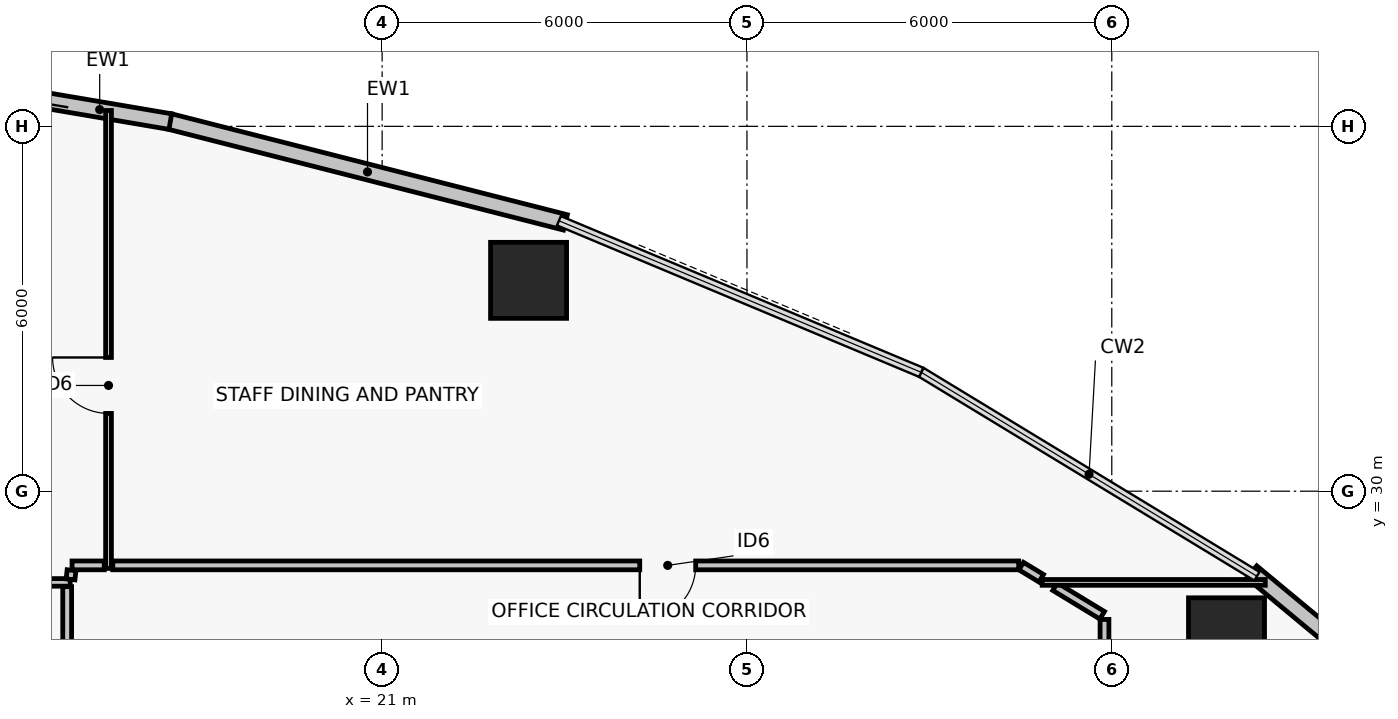
"""IFC4 building model, lengths in metres.
Left out: names, types, materials, properties, quantities, classifications, styles, units other than length and angle.
Written with IfcOpenShell. Run it as: python <this file> out.ifc"""

import sys

from ifc_helpers import new_model, si_unit, direction, frame, frame_2d, origin, origin_2d, place, context, subcontext, project, spatial, rectangle, hollow_rectangle, extrude, element, fill, save


model = new_model("IFC4")
c1 = context("Model", 3, precision=1e-05, world=origin(), true_north=direction((0.0, 1.0)))
c2 = subcontext(c1, "Body", "Model", "MODEL_VIEW")
j1 = project(units=[si_unit("LENGTHUNIT", "METRE"), si_unit("PLANEANGLEUNIT", "RADIAN")], contexts=[c1])
p1 = place(None, origin())
s1 = spatial("IfcSite", under=j1, at=p1, CompositionType="ELEMENT")
p2 = place(p1, origin())
s2 = spatial("IfcBuilding", under=s1, at=p2, CompositionType="ELEMENT")
p3 = place(p2, frame((0.0, 0.0, 75.96)))
s3 = spatial("IfcBuildingStorey", under=s2, at=p3, CompositionType="ELEMENT", Elevation=75.96)
for number, where, z_axis, x_axis in (
    (1, (34.887, 27.622, 0.0), (0.0, 0.0, 1.0), (1.0, 0.0, 0.0)),
    (2, (23.408, 33.467, 0.0), (0.0, 0.0, 1.0), (1.0, 0.0, 0.0)),
):
    element("IfcColumn", number, at=place(p3, frame(where, z_axis=z_axis, x_axis=x_axis)), inside=s3, PredefinedType="COLUMN", context=c2, shape_type="SweptSolid", body=[
        extrude(hollow_rectangle(XDim=1.25, YDim=1.25, WallThickness=0.05, at=origin_2d()), origin(), (0.0, 0.0, 1.0), 3.72),
    ])
p4 = place(p3, frame((35.301, 28.672, 0.0), z_axis=(0.0, 0.0, 1.0), x_axis=(0.76975316947, -0.638341646841, 0.0)))
e3 = element("IfcWall", 3, at=p4, inside=s3, PredefinedType="PARTITIONING", context=c2, shape_type="SweptSolid", body=[
    extrude(rectangle(XDim=6.718, YDim=0.26, at=frame_2d((3.359, 0.0))), origin(), (0.0, 0.0, 1.0), 3.47),
])
p5 = place(p3, frame((17.505, 36.081, 0.0), z_axis=(0.0, 0.0, 1.0), x_axis=(0.968981437296, -0.247133514876, 0.0)))
e4 = element("IfcWall", 4, at=p5, inside=s3, PredefinedType="PARTITIONING", context=c2, shape_type="SweptSolid", body=[
    extrude(rectangle(XDim=6.718, YDim=0.26, at=frame_2d((3.359, 0.0))), origin(), (0.0, 0.0, 1.0), 3.47),
])
p6 = place(p3, frame((15.193, 36.472, 0.0), z_axis=(0.0, 0.0, 1.0), x_axis=(0.985905269947, -0.167304508875, 0.0)))
e5 = element("IfcWall", 5, at=p6, inside=s3, PredefinedType="PARTITIONING", context=c2, shape_type="SweptSolid", body=[
    extrude(rectangle(XDim=2.357, YDim=0.26, at=frame_2d((1.178, 0.0))), origin(), (0.0, 0.0, 1.0), 3.47),
])
p7 = place(p3, frame((32.88, 27.22, 0.0), z_axis=(0.0, 0.0, 1.0), x_axis=(0.0, 1.0, 0.0)))
e6 = element("IfcWall", 6, at=p7, inside=s3, PredefinedType="PARTITIONING", context=c2, shape_type="SweptSolid", body=[
    extrude(rectangle(XDim=0.671, YDim=0.145, at=frame_2d((0.335, 0.0))), origin(), (0.0, 0.0, 1.0), 2.6),
])
p8 = place(p3, frame((32.842, 27.96, 0.0), z_axis=(0.0, 0.0, 1.0), x_axis=(-0.854770437211, 0.519006261686, 0.0)))
e7 = element("IfcWall", 7, at=p8, inside=s3, PredefinedType="PARTITIONING", context=c2, shape_type="SweptSolid", body=[
    extrude(rectangle(XDim=0.906, YDim=0.145, at=frame_2d((0.453, 0.0))), origin(), (0.0, 0.0, 1.0), 3.0),
])
p9 = place(p3, frame((31.84, 28.568, 0.0), z_axis=(0.0, 0.0, 1.0), x_axis=(-0.854857682939, 0.518862546269, 0.0)))
e8 = element("IfcWall", 8, at=p9, inside=s3, PredefinedType="PARTITIONING", context=c2, shape_type="SweptSolid", body=[
    extrude(rectangle(XDim=0.386, YDim=0.145, at=frame_2d((0.193, 0.0))), origin(), (0.0, 0.0, 1.0), 3.0),
])
p10 = place(p3, frame((31.469, 28.78, 0.0), z_axis=(0.0, 0.0, 1.0), x_axis=(-1.0, 0.0, 0.0)))
e9 = element("IfcWall", 9, at=p10, inside=s3, PredefinedType="PARTITIONING", context=c2, shape_type="SweptSolid", body=[
    extrude(rectangle(XDim=14.898, YDim=0.145, at=frame_2d((7.449, 0.0))), origin(), (0.0, 0.0, 1.0), 2.6),
])
p11 = place(p10, frame((5.312, 0.0, 0.0)))
e10 = element("IfcOpeningElement", 10, at=p11, cuts=e9, PredefinedType="OPENING", context=c2, shape_type="SweptSolid", body=[
    extrude(rectangle(XDim=0.92, YDim=2.05, at=frame_2d((0.46, 1.025))), frame((0.0, 0.083, 0.0), z_axis=(0.0, -1.0, 0.0), x_axis=(1.0, 0.0, 0.0)), (0.0, 0.0, 1.0), 0.165),
])
p12 = place(p3, frame((16.43, 28.78, 0.0), z_axis=(0.0, 0.0, 1.0), x_axis=(-1.0, 0.0, 0.0)))
e11 = element("IfcWall", 11, at=p12, inside=s3, PredefinedType="PARTITIONING", context=c2, shape_type="SweptSolid", body=[
    extrude(rectangle(XDim=0.53, YDim=0.145, at=frame_2d((0.265, 0.0))), origin(), (0.0, 0.0, 1.0), 3.0),
])
p13 = place(p3, frame((15.82, 28.43, 0.0), z_axis=(0.0, 0.0, 1.0), x_axis=(0.0, -1.0, 0.0)))
e12 = element("IfcWall", 12, at=p13, inside=s3, PredefinedType="PARTITIONING", context=c2, shape_type="SweptSolid", body=[
    extrude(rectangle(XDim=6.36, YDim=0.145, at=frame_2d((3.18, 0.0))), origin(), (0.0, 0.0, 1.0), 2.6),
])
p14 = place(p13, frame((5.16, 0.0, 0.0)))
e13 = element("IfcOpeningElement", 13, at=p14, cuts=e12, PredefinedType="OPENING", context=c2, shape_type="SweptSolid", body=[
    extrude(rectangle(XDim=0.92, YDim=2.05, at=frame_2d((0.46, 1.025))), frame((0.0, 0.083, 0.0), z_axis=(0.0, -1.0, 0.0), x_axis=(1.0, 0.0, 0.0)), (0.0, 0.0, 1.0), 0.165),
])
p15 = place(p3, frame((16.5, 28.73, 0.0), z_axis=(0.0, 0.0, 1.0), x_axis=(0.0, 1.0, 0.0)))
e14 = element("IfcWall", 14, at=p15, inside=s3, PredefinedType="PARTITIONING", context=c2, shape_type="SweptSolid", body=[
    extrude(rectangle(XDim=7.531, YDim=0.095, at=frame_2d((3.765, 0.0))), origin(), (0.0, 0.0, 1.0), 2.6),
])
p16 = place(p15, frame((2.549, 0.0, 0.0)))
e15 = element("IfcOpeningElement", 15, at=p16, cuts=e14, PredefinedType="OPENING", context=c2, shape_type="SweptSolid", body=[
    extrude(rectangle(XDim=0.92, YDim=2.05, at=frame_2d((0.46, 1.025))), frame((0.0, 0.057, 0.0), z_axis=(0.0, -1.0, 0.0), x_axis=(1.0, 0.0, 0.0)), (0.0, 0.0, 1.0), 0.115),
])
p17 = place(p3, frame((11.644, 28.5, 0.0), z_axis=(0.0, 0.0, 1.0), x_axis=(1.0, 0.0, 0.0)))
e16 = element("IfcWall", 16, at=p17, inside=s3, PredefinedType="PARTITIONING", context=c2, shape_type="SweptSolid", body=[
    extrude(rectangle(XDim=4.227, YDim=0.125, at=frame_2d((2.113, 0.0))), origin(), (0.0, 0.0, 1.0), 2.85),
])
p18 = place(p3, frame((31.856, 28.5, 0.0), z_axis=(0.0, 0.0, 1.0), x_axis=(1.0, 0.0, 0.0)))
e17 = element("IfcWall", 17, at=p18, inside=s3, PredefinedType="PARTITIONING", context=c2, shape_type="SweptSolid", body=[
    extrude(rectangle(XDim=3.669, YDim=0.095, at=frame_2d((1.834, 0.0))), origin(), (0.0, 0.0, 1.0), 2.85),
])
p19 = place(p3, frame((15.892, 28.7, 0.0), z_axis=(0.0, 0.0, 1.0), x_axis=(-0.107955324157, -0.994155746343, 0.0)))
e18 = element("IfcWall", 18, at=p19, inside=s3, PredefinedType="PARTITIONING", context=c2, shape_type="SweptSolid", body=[
    extrude(rectangle(XDim=0.152, YDim=0.145, at=frame_2d((0.076, 0.0))), origin(), (0.0, 0.0, 1.0), 3.47),
])
p20 = place(p11, origin())
e19 = element("IfcDoor", 19, at=p20, inside=s3, OperationType="SINGLE_SWING_RIGHT", PredefinedType="DOOR", context=c2, shape_type="SweptSolid", body=[
    extrude(rectangle(XDim=0.92, YDim=2.05, at=frame_2d((0.46, 1.025))), frame((0.0, 0.025, 0.0), z_axis=(0.0, -1.0, 0.0), x_axis=(1.0, 0.0, 0.0)), (0.0, 0.0, 1.0), 0.05),
])
fill(e10, e19)
p21 = place(p16, origin())
e20 = element("IfcDoor", 20, at=p21, inside=s3, OperationType="SINGLE_SWING_RIGHT", PredefinedType="DOOR", context=c2, shape_type="SweptSolid", body=[
    extrude(rectangle(XDim=0.92, YDim=2.05, at=frame_2d((0.46, 1.025))), frame((0.0, 0.025, 0.0), z_axis=(0.0, -1.0, 0.0), x_axis=(1.0, 0.0, 0.0)), (0.0, 0.0, 1.0), 0.05),
])
fill(e15, e20)
save(model, sys.argv[1])
